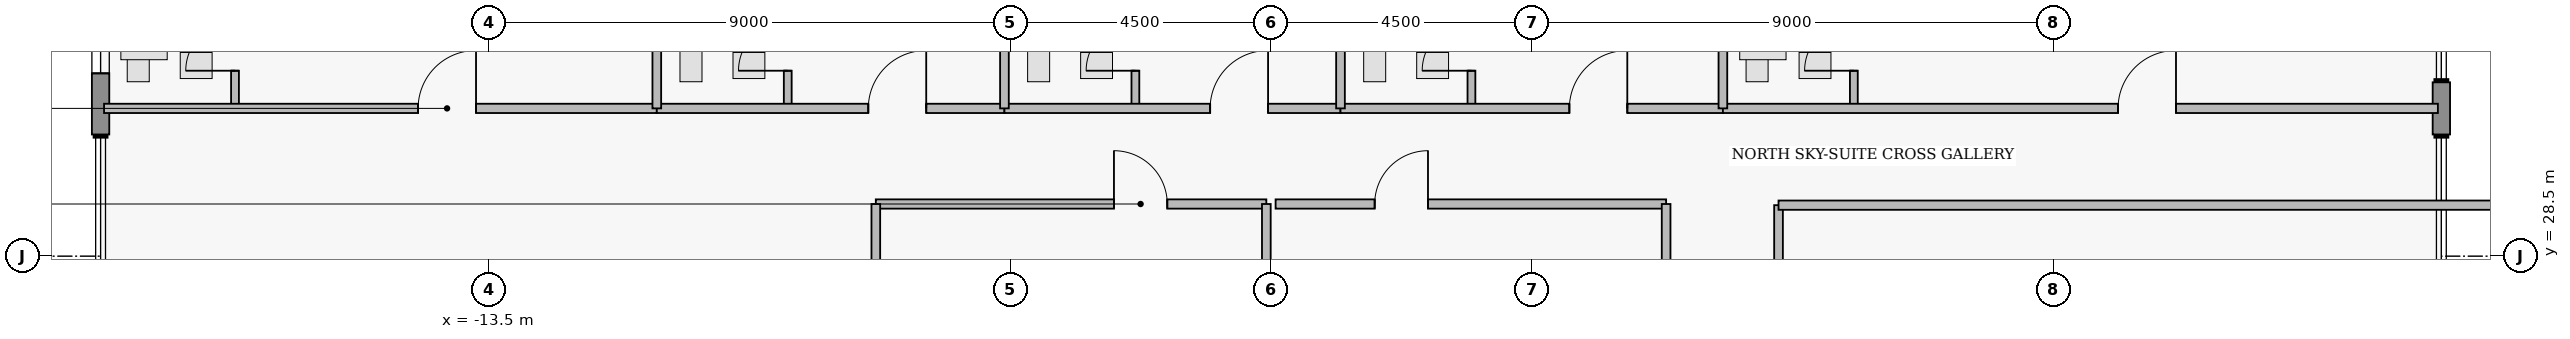
"""IFC4 building model, lengths in metres.
Left out: names, types, materials, properties, quantities, classifications, styles, units other than length and angle.
Written with IfcOpenShell. Run it as: python <this file> out.ifc"""

import sys

from ifc_helpers import new_model, si_unit, direction, frame, frame_2d, origin, place, context, subcontext, project, spatial, rectangle, extrude, element, fill, save


model = new_model("IFC4")
c1 = context("Model", 3, precision=1e-05, world=origin(), true_north=direction((0.0, 1.0)))
c2 = subcontext(c1, "Body", "Model", "MODEL_VIEW")
j1 = project(units=[si_unit("LENGTHUNIT", "METRE"), si_unit("PLANEANGLEUNIT", "RADIAN")], contexts=[c1])
p1 = place(None, origin())
s1 = spatial("IfcSite", under=j1, at=p1, CompositionType="ELEMENT")
p2 = place(p1, origin())
s2 = spatial("IfcBuilding", under=s1, at=p2, CompositionType="ELEMENT")
p3 = place(p2, frame((0.0, 0.0, 239.65)))
s3 = spatial("IfcBuildingStorey", under=s2, at=p3, CompositionType="ELEMENT", Elevation=239.65)
p4 = place(p3, frame((-20.2, 30.6, 0.0), z_axis=(0.0, 0.0, 1.0), x_axis=(0.0, 1.0, 0.0)))
e1 = element("IfcWall", 1, at=p4, inside=s3, PredefinedType="STANDARD", context=c2, shape_type="SweptSolid", body=[
    extrude(rectangle(XDim=5.0, YDim=0.3, at=frame_2d((2.5, 0.0))), origin(), (0.0, 0.0, 1.0), 3.48),
])
p5 = place(p4, frame((1.055, 0.0, 0.95)))
e2 = element("IfcOpeningElement", 2, at=p5, cuts=e1, PredefinedType="OPENING", context=c2, shape_type="SweptSolid", body=[
    extrude(rectangle(XDim=1.15, YDim=1.55, at=frame_2d((0.575, 0.775))), frame((0.0, 0.16, 0.0), z_axis=(0.0, -1.0, 0.0), x_axis=(1.0, 0.0, 0.0)), (0.0, 0.0, 1.0), 0.32),
])
p6 = place(p4, frame((3.27, 0.0, 0.95)))
e3 = element("IfcOpeningElement", 3, at=p6, cuts=e1, PredefinedType="OPENING", context=c2, shape_type="SweptSolid", body=[
    extrude(rectangle(XDim=1.15, YDim=1.55, at=frame_2d((0.575, 0.775))), frame((0.0, 0.16, 0.0), z_axis=(0.0, -1.0, 0.0), x_axis=(1.0, 0.0, 0.0)), (0.0, 0.0, 1.0), 0.32),
])
p7 = place(p3, frame((20.2, 31.5, 0.0), z_axis=(0.0, 0.0, 1.0), x_axis=(0.0, -1.0, 0.0)))
e4 = element("IfcWall", 4, at=p7, inside=s3, PredefinedType="STANDARD", context=c2, shape_type="SweptSolid", body=[
    extrude(rectangle(XDim=0.9, YDim=0.3, at=frame_2d((0.45, 0.0))), origin(), (0.0, 0.0, 1.0), 3.48),
])
p8 = place(p3, frame((-17.88, 31.05, 0.0), z_axis=(0.0, 0.0, 1.0), x_axis=(0.0, 1.0, 0.0)))
e5 = element("IfcWall", 5, at=p8, inside=s3, PredefinedType="PLUMBINGWALL", context=c2, shape_type="SweptSolid", body=[
    extrude(rectangle(XDim=2.36, YDim=0.135, at=frame_2d((1.18, 0.0))), origin(), (0.0, 0.0, 1.0), 3.48),
])
p9 = place(p8, frame((0.65, 0.0, 0.0)))
e6 = element("IfcOpeningElement", 6, at=p9, cuts=e5, PredefinedType="OPENING", context=c2, shape_type="SweptSolid", body=[
    extrude(rectangle(XDim=0.85, YDim=2.1, at=frame_2d((0.425, 1.05))), frame((0.0, 0.077, 0.0), z_axis=(0.0, -1.0, 0.0), x_axis=(1.0, 0.0, 0.0)), (0.0, 0.0, 1.0), 0.155),
])
p10 = place(p3, frame((-20.14, 31.05, 0.0), z_axis=(0.0, 0.0, 1.0), x_axis=(1.0, 0.0, 0.0)))
e7 = element("IfcWall", 7, at=p10, inside=s3, PredefinedType="PARTITIONING", context=c2, shape_type="SweptSolid", body=[
    extrude(rectangle(XDim=9.54, YDim=0.16, at=frame_2d((4.77, 0.0))), origin(), (0.0, 0.0, 1.0), 3.48),
])
p11 = place(p10, frame((5.42, 0.0, 0.0)))
e8 = element("IfcOpeningElement", 8, at=p11, cuts=e7, PredefinedType="OPENING", context=c2, shape_type="SweptSolid", body=[
    extrude(rectangle(XDim=1.0, YDim=2.15, at=frame_2d((0.5, 1.075))), frame((0.0, 0.09, 0.0), z_axis=(0.0, -1.0, 0.0), x_axis=(1.0, 0.0, 0.0)), (0.0, 0.0, 1.0), 0.18),
])
p12 = place(p3, frame((-8.34, 31.05, 0.0), z_axis=(0.0, 0.0, 1.0), x_axis=(0.0, 1.0, 0.0)))
e9 = element("IfcWall", 9, at=p12, inside=s3, PredefinedType="PLUMBINGWALL", context=c2, shape_type="SweptSolid", body=[
    extrude(rectangle(XDim=2.36, YDim=0.135, at=frame_2d((1.18, 0.0))), origin(), (0.0, 0.0, 1.0), 3.48),
])
p13 = place(p12, frame((0.65, 0.0, 0.0)))
e10 = element("IfcOpeningElement", 10, at=p13, cuts=e9, PredefinedType="OPENING", context=c2, shape_type="SweptSolid", body=[
    extrude(rectangle(XDim=0.85, YDim=2.1, at=frame_2d((0.425, 1.05))), frame((0.0, 0.077, 0.0), z_axis=(0.0, -1.0, 0.0), x_axis=(1.0, 0.0, 0.0)), (0.0, 0.0, 1.0), 0.155),
])
p14 = place(p3, frame((-10.6, 31.05, 0.0), z_axis=(0.0, 0.0, 1.0), x_axis=(1.0, 0.0, 0.0)))
e11 = element("IfcWall", 11, at=p14, inside=s3, PredefinedType="PARTITIONING", context=c2, shape_type="SweptSolid", body=[
    extrude(rectangle(XDim=6.0, YDim=0.16, at=frame_2d((3.0, 0.0))), origin(), (0.0, 0.0, 1.0), 3.48),
])
p15 = place(p14, frame((3.65, 0.0, 0.0)))
e12 = element("IfcOpeningElement", 12, at=p15, cuts=e11, PredefinedType="OPENING", context=c2, shape_type="SweptSolid", body=[
    extrude(rectangle(XDim=1.0, YDim=2.15, at=frame_2d((0.5, 1.075))), frame((0.0, 0.09, 0.0), z_axis=(0.0, -1.0, 0.0), x_axis=(1.0, 0.0, 0.0)), (0.0, 0.0, 1.0), 0.18),
])
p16 = place(p3, frame((-2.34, 31.05, 0.0), z_axis=(0.0, 0.0, 1.0), x_axis=(0.0, 1.0, 0.0)))
e13 = element("IfcWall", 13, at=p16, inside=s3, PredefinedType="PLUMBINGWALL", context=c2, shape_type="SweptSolid", body=[
    extrude(rectangle(XDim=2.36, YDim=0.135, at=frame_2d((1.18, 0.0))), origin(), (0.0, 0.0, 1.0), 3.48),
])
p17 = place(p16, frame((0.65, 0.0, 0.0)))
e14 = element("IfcOpeningElement", 14, at=p17, cuts=e13, PredefinedType="OPENING", context=c2, shape_type="SweptSolid", body=[
    extrude(rectangle(XDim=0.85, YDim=2.1, at=frame_2d((0.425, 1.05))), frame((0.0, 0.077, 0.0), z_axis=(0.0, -1.0, 0.0), x_axis=(1.0, 0.0, 0.0)), (0.0, 0.0, 1.0), 0.155),
])
p18 = place(p3, frame((-4.6, 31.05, 0.0), z_axis=(0.0, 0.0, 1.0), x_axis=(1.0, 0.0, 0.0)))
e15 = element("IfcWall", 15, at=p18, inside=s3, PredefinedType="PARTITIONING", context=c2, shape_type="SweptSolid", body=[
    extrude(rectangle(XDim=5.8, YDim=0.16, at=frame_2d((2.9, 0.0))), origin(), (0.0, 0.0, 1.0), 3.48),
])
p19 = place(p18, frame((3.55, 0.0, 0.0)))
e16 = element("IfcOpeningElement", 16, at=p19, cuts=e15, PredefinedType="OPENING", context=c2, shape_type="SweptSolid", body=[
    extrude(rectangle(XDim=1.0, YDim=2.15, at=frame_2d((0.5, 1.075))), frame((0.0, 0.09, 0.0), z_axis=(0.0, -1.0, 0.0), x_axis=(1.0, 0.0, 0.0)), (0.0, 0.0, 1.0), 0.18),
])
p20 = place(p3, frame((3.46, 31.05, 0.0), z_axis=(0.0, 0.0, 1.0), x_axis=(0.0, 1.0, 0.0)))
e17 = element("IfcWall", 17, at=p20, inside=s3, PredefinedType="PLUMBINGWALL", context=c2, shape_type="SweptSolid", body=[
    extrude(rectangle(XDim=2.36, YDim=0.135, at=frame_2d((1.18, 0.0))), origin(), (0.0, 0.0, 1.0), 3.48),
])
p21 = place(p20, frame((0.65, 0.0, 0.0)))
e18 = element("IfcOpeningElement", 18, at=p21, cuts=e17, PredefinedType="OPENING", context=c2, shape_type="SweptSolid", body=[
    extrude(rectangle(XDim=0.85, YDim=2.1, at=frame_2d((0.425, 1.05))), frame((0.0, 0.077, 0.0), z_axis=(0.0, -1.0, 0.0), x_axis=(1.0, 0.0, 0.0)), (0.0, 0.0, 1.0), 0.155),
])
p22 = place(p3, frame((1.2, 31.05, 0.0), z_axis=(0.0, 0.0, 1.0), x_axis=(1.0, 0.0, 0.0)))
e19 = element("IfcWall", 19, at=p22, inside=s3, PredefinedType="PARTITIONING", context=c2, shape_type="SweptSolid", body=[
    extrude(rectangle(XDim=6.6, YDim=0.16, at=frame_2d((3.3, 0.0))), origin(), (0.0, 0.0, 1.0), 3.48),
])
p23 = place(p22, frame((3.95, 0.0, 0.0)))
e20 = element("IfcOpeningElement", 20, at=p23, cuts=e19, PredefinedType="OPENING", context=c2, shape_type="SweptSolid", body=[
    extrude(rectangle(XDim=1.0, YDim=2.15, at=frame_2d((0.5, 1.075))), frame((0.0, 0.09, 0.0), z_axis=(0.0, -1.0, 0.0), x_axis=(1.0, 0.0, 0.0)), (0.0, 0.0, 1.0), 0.18),
])
p24 = place(p3, frame((10.06, 31.05, 0.0), z_axis=(0.0, 0.0, 1.0), x_axis=(0.0, 1.0, 0.0)))
e21 = element("IfcWall", 21, at=p24, inside=s3, PredefinedType="PLUMBINGWALL", context=c2, shape_type="SweptSolid", body=[
    extrude(rectangle(XDim=2.36, YDim=0.135, at=frame_2d((1.18, 0.0))), origin(), (0.0, 0.0, 1.0), 3.48),
])
p25 = place(p24, frame((0.65, 0.0, 0.0)))
e22 = element("IfcOpeningElement", 22, at=p25, cuts=e21, PredefinedType="OPENING", context=c2, shape_type="SweptSolid", body=[
    extrude(rectangle(XDim=0.85, YDim=2.1, at=frame_2d((0.425, 1.05))), frame((0.0, 0.077, 0.0), z_axis=(0.0, -1.0, 0.0), x_axis=(1.0, 0.0, 0.0)), (0.0, 0.0, 1.0), 0.155),
])
p26 = place(p3, frame((7.8, 31.05, 0.0), z_axis=(0.0, 0.0, 1.0), x_axis=(1.0, 0.0, 0.0)))
e23 = element("IfcWall", 23, at=p26, inside=s3, PredefinedType="PARTITIONING", context=c2, shape_type="SweptSolid", body=[
    extrude(rectangle(XDim=12.34, YDim=0.16, at=frame_2d((6.17, 0.0))), origin(), (0.0, 0.0, 1.0), 3.48),
])
p27 = place(p26, frame((6.82, 0.0, 0.0)))
e24 = element("IfcOpeningElement", 24, at=p27, cuts=e23, PredefinedType="OPENING", context=c2, shape_type="SweptSolid", body=[
    extrude(rectangle(XDim=1.0, YDim=2.15, at=frame_2d((0.5, 1.075))), frame((0.0, 0.09, 0.0), z_axis=(0.0, -1.0, 0.0), x_axis=(1.0, 0.0, 0.0)), (0.0, 0.0, 1.0), 0.18),
])
p28 = place(p3, frame((-6.82, 29.4, 0.0), z_axis=(0.0, 0.0, 1.0), x_axis=(1.0, 0.0, 0.0)))
e25 = element("IfcWall", 25, at=p28, inside=s3, PredefinedType="PARTITIONING", context=c2, shape_type="SweptSolid", body=[
    extrude(rectangle(XDim=6.74, YDim=0.16, at=frame_2d((3.37, 0.0))), origin(), (0.0, 0.0, 1.0), 3.48),
])
p29 = place(p28, frame((4.11, 0.0, 0.0)))
e26 = element("IfcOpeningElement", 26, at=p29, cuts=e25, PredefinedType="OPENING", context=c2, shape_type="SweptSolid", body=[
    extrude(rectangle(XDim=0.92, YDim=2.12, at=frame_2d((0.46, 1.06))), frame((0.0, 0.09, 0.0), z_axis=(0.0, -1.0, 0.0), x_axis=(1.0, 0.0, 0.0)), (0.0, 0.0, 1.0), 0.18),
])
p30 = place(p3, frame((0.08, 29.4, 0.0), z_axis=(0.0, 0.0, 1.0), x_axis=(1.0, 0.0, 0.0)))
e27 = element("IfcWall", 27, at=p30, inside=s3, PredefinedType="PARTITIONING", context=c2, shape_type="SweptSolid", body=[
    extrude(rectangle(XDim=6.74, YDim=0.16, at=frame_2d((3.37, 0.0))), origin(), (0.0, 0.0, 1.0), 3.48),
])
p31 = place(p30, frame((1.71, 0.0, 0.0)))
e28 = element("IfcOpeningElement", 28, at=p31, cuts=e27, PredefinedType="OPENING", context=c2, shape_type="SweptSolid", body=[
    extrude(rectangle(XDim=0.92, YDim=2.12, at=frame_2d((0.46, 1.06))), frame((0.0, 0.09, 0.0), z_axis=(0.0, -1.0, 0.0), x_axis=(1.0, 0.0, 0.0)), (0.0, 0.0, 1.0), 0.18),
])
p32 = place(p3, frame((-10.6, 31.05, 0.0), z_axis=(0.0, 0.0, 1.0), x_axis=(0.0, 1.0, 0.0)))
e29 = element("IfcWall", 29, at=p32, inside=s3, PredefinedType="PARTITIONING", context=c2, shape_type="SweptSolid", body=[
    extrude(rectangle(XDim=7.87, YDim=0.15, at=frame_2d((3.935, 0.0))), origin(), (0.0, 0.0, 1.0), 3.48),
])
p33 = place(p3, frame((-4.6, 31.05, 0.0), z_axis=(0.0, 0.0, 1.0), x_axis=(0.0, 1.0, 0.0)))
e30 = element("IfcWall", 30, at=p33, inside=s3, PredefinedType="PARTITIONING", context=c2, shape_type="SweptSolid", body=[
    extrude(rectangle(XDim=7.87, YDim=0.15, at=frame_2d((3.935, 0.0))), origin(), (0.0, 0.0, 1.0), 2.362),
])
for number, where, z_axis, x_axis in (
    (31, (1.2, 31.05, 0.0), (0.0, 0.0, 1.0), (0.0, 1.0, 0.0)),
    (32, (7.8, 31.05, 0.0), (0.0, 0.0, 1.0), (0.0, 1.0, 0.0)),
):
    element("IfcWall", number, at=place(p3, frame(where, z_axis=z_axis, x_axis=x_axis)), inside=s3, PredefinedType="PARTITIONING", context=c2, shape_type="SweptSolid", body=[
        extrude(rectangle(XDim=7.87, YDim=0.15, at=frame_2d((3.935, 0.0))), origin(), (0.0, 0.0, 1.0), 3.48),
    ])
for number, where, z_axis, x_axis in (
    (33, (-6.82, 27.0, 0.0), (0.0, 0.0, 1.0), (0.0, 1.0, 0.0)),
    (34, (-0.08, 27.0, 0.0), (0.0, 0.0, 1.0), (0.0, 1.0, 0.0)),
    (35, (6.82, 27.0, 0.0), (0.0, 0.0, 1.0), (0.0, 1.0, 0.0)),
):
    element("IfcWall", number, at=place(p3, frame(where, z_axis=z_axis, x_axis=x_axis)), inside=s3, PredefinedType="PARTITIONING", context=c2, shape_type="SweptSolid", body=[
        extrude(rectangle(XDim=2.4, YDim=0.15, at=frame_2d((1.2, 0.0))), origin(), (0.0, 0.0, 1.0), 3.48),
    ])
p34 = place(p3, frame((8.76, 16.7, 0.0), z_axis=(0.0, 0.0, 1.0), x_axis=(0.0, 1.0, 0.0)))
e36 = element("IfcWall", 36, at=p34, inside=s3, PredefinedType="PARTITIONING", context=c2, shape_type="SweptSolid", body=[
    extrude(rectangle(XDim=12.68, YDim=0.15, at=frame_2d((6.34, 0.0))), origin(), (0.0, 0.0, 1.0), 3.48),
])
p35 = place(p3, frame((8.76, 29.38, 0.0), z_axis=(0.0, 0.0, 1.0), x_axis=(1.0, 0.0, 0.0)))
e37 = element("IfcWall", 37, at=p35, inside=s3, PredefinedType="PARTITIONING", context=c2, shape_type="SweptSolid", body=[
    extrude(rectangle(XDim=13.88, YDim=0.16, at=frame_2d((6.94, 0.0))), origin(), (0.0, 0.0, 1.0), 3.48),
])
p36 = place(p5, origin())
e38 = element("IfcWindow", 38, at=p36, inside=s3, PartitioningType="SINGLE_PANEL", PredefinedType="WINDOW", context=c2, shape_type="SweptSolid", body=[
    extrude(rectangle(XDim=1.15, YDim=1.55, at=frame_2d((0.575, 0.775))), frame((0.0, 0.03, 0.0), z_axis=(0.0, -1.0, 0.0), x_axis=(1.0, 0.0, 0.0)), (0.0, 0.0, 1.0), 0.06),
])
fill(e2, e38)
p37 = place(p9, origin())
e39 = element("IfcDoor", 39, at=p37, inside=s3, OperationType="SINGLE_SWING_LEFT", PredefinedType="DOOR", context=c2, shape_type="SweptSolid", body=[
    extrude(rectangle(XDim=0.85, YDim=2.1, at=frame_2d((0.425, 1.05))), frame((0.0, 0.025, 0.0), z_axis=(0.0, -1.0, 0.0), x_axis=(1.0, 0.0, 0.0)), (0.0, 0.0, 1.0), 0.05),
])
fill(e6, e39)
p38 = place(p11, origin())
e40 = element("IfcDoor", 40, at=p38, inside=s3, OperationType="SINGLE_SWING_RIGHT", PredefinedType="DOOR", context=c2, shape_type="SweptSolid", body=[
    extrude(rectangle(XDim=1.0, YDim=2.15, at=frame_2d((0.5, 1.075))), frame((0.0, 0.025, 0.0), z_axis=(0.0, -1.0, 0.0), x_axis=(1.0, 0.0, 0.0)), (0.0, 0.0, 1.0), 0.05),
])
fill(e8, e40)
p39 = place(p13, origin())
e41 = element("IfcDoor", 41, at=p39, inside=s3, OperationType="SINGLE_SWING_LEFT", PredefinedType="DOOR", context=c2, shape_type="SweptSolid", body=[
    extrude(rectangle(XDim=0.85, YDim=2.1, at=frame_2d((0.425, 1.05))), frame((0.0, 0.025, 0.0), z_axis=(0.0, -1.0, 0.0), x_axis=(1.0, 0.0, 0.0)), (0.0, 0.0, 1.0), 0.05),
])
fill(e10, e41)
p40 = place(p15, origin())
e42 = element("IfcDoor", 42, at=p40, inside=s3, OperationType="SINGLE_SWING_RIGHT", PredefinedType="DOOR", context=c2, shape_type="SweptSolid", body=[
    extrude(rectangle(XDim=1.0, YDim=2.15, at=frame_2d((0.5, 1.075))), frame((0.0, 0.025, 0.0), z_axis=(0.0, -1.0, 0.0), x_axis=(1.0, 0.0, 0.0)), (0.0, 0.0, 1.0), 0.05),
])
fill(e12, e42)
p41 = place(p17, origin())
e43 = element("IfcDoor", 43, at=p41, inside=s3, OperationType="SINGLE_SWING_LEFT", PredefinedType="DOOR", context=c2, shape_type="SweptSolid", body=[
    extrude(rectangle(XDim=0.85, YDim=2.1, at=frame_2d((0.425, 1.05))), frame((0.0, 0.025, 0.0), z_axis=(0.0, -1.0, 0.0), x_axis=(1.0, 0.0, 0.0)), (0.0, 0.0, 1.0), 0.05),
])
fill(e14, e43)
p42 = place(p19, origin())
e44 = element("IfcDoor", 44, at=p42, inside=s3, OperationType="SINGLE_SWING_RIGHT", PredefinedType="DOOR", context=c2, shape_type="SweptSolid", body=[
    extrude(rectangle(XDim=1.0, YDim=2.15, at=frame_2d((0.5, 1.075))), frame((0.0, 0.025, 0.0), z_axis=(0.0, -1.0, 0.0), x_axis=(1.0, 0.0, 0.0)), (0.0, 0.0, 1.0), 0.05),
])
fill(e16, e44)
p43 = place(p21, origin())
e45 = element("IfcDoor", 45, at=p43, inside=s3, OperationType="SINGLE_SWING_LEFT", PredefinedType="DOOR", context=c2, shape_type="SweptSolid", body=[
    extrude(rectangle(XDim=0.85, YDim=2.1, at=frame_2d((0.425, 1.05))), frame((0.0, 0.025, 0.0), z_axis=(0.0, -1.0, 0.0), x_axis=(1.0, 0.0, 0.0)), (0.0, 0.0, 1.0), 0.05),
])
fill(e18, e45)
p44 = place(p23, origin())
e46 = element("IfcDoor", 46, at=p44, inside=s3, OperationType="SINGLE_SWING_RIGHT", PredefinedType="DOOR", context=c2, shape_type="SweptSolid", body=[
    extrude(rectangle(XDim=1.0, YDim=2.15, at=frame_2d((0.5, 1.075))), frame((0.0, 0.025, 0.0), z_axis=(0.0, -1.0, 0.0), x_axis=(1.0, 0.0, 0.0)), (0.0, 0.0, 1.0), 0.05),
])
fill(e20, e46)
p45 = place(p25, origin())
e47 = element("IfcDoor", 47, at=p45, inside=s3, OperationType="SINGLE_SWING_LEFT", PredefinedType="DOOR", context=c2, shape_type="SweptSolid", body=[
    extrude(rectangle(XDim=0.85, YDim=2.1, at=frame_2d((0.425, 1.05))), frame((0.0, 0.025, 0.0), z_axis=(0.0, -1.0, 0.0), x_axis=(1.0, 0.0, 0.0)), (0.0, 0.0, 1.0), 0.05),
])
fill(e22, e47)
p46 = place(p27, origin())
e48 = element("IfcDoor", 48, at=p46, inside=s3, OperationType="SINGLE_SWING_RIGHT", PredefinedType="DOOR", context=c2, shape_type="SweptSolid", body=[
    extrude(rectangle(XDim=1.0, YDim=2.15, at=frame_2d((0.5, 1.075))), frame((0.0, 0.025, 0.0), z_axis=(0.0, -1.0, 0.0), x_axis=(1.0, 0.0, 0.0)), (0.0, 0.0, 1.0), 0.05),
])
fill(e24, e48)
p47 = place(p29, origin())
e49 = element("IfcDoor", 49, at=p47, inside=s3, OperationType="SINGLE_SWING_LEFT", PredefinedType="DOOR", context=c2, shape_type="SweptSolid", body=[
    extrude(rectangle(XDim=0.92, YDim=2.12, at=frame_2d((0.46, 1.06))), frame((0.0, 0.025, 0.0), z_axis=(0.0, -1.0, 0.0), x_axis=(1.0, 0.0, 0.0)), (0.0, 0.0, 1.0), 0.05),
])
fill(e26, e49)
p48 = place(p31, origin())
e50 = element("IfcDoor", 50, at=p48, inside=s3, OperationType="SINGLE_SWING_RIGHT", PredefinedType="DOOR", context=c2, shape_type="SweptSolid", body=[
    extrude(rectangle(XDim=0.92, YDim=2.12, at=frame_2d((0.46, 1.06))), frame((0.0, 0.025, 0.0), z_axis=(0.0, -1.0, 0.0), x_axis=(1.0, 0.0, 0.0)), (0.0, 0.0, 1.0), 0.05),
])
fill(e28, e50)
save(model, sys.argv[1])
